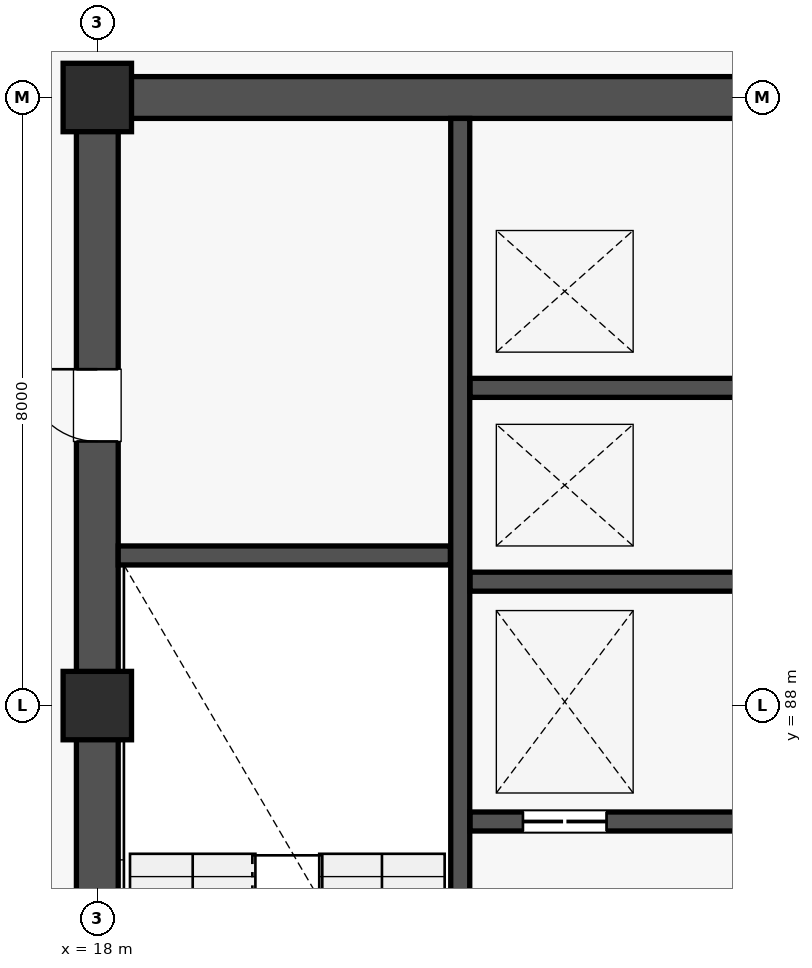
"""IFC4 building model, lengths in metres.
Left out: names, types, materials, properties, quantities, classifications, styles, units other than length and angle.
Written with IfcOpenShell. Run it as: python <this file> out.ifc"""

import sys

from ifc_helpers import new_model, si_unit, direction, frame, frame_2d, origin, origin_2d, place, context, subcontext, project, spatial, rectangle, extrude, element, fill, save


model = new_model("IFC4")
c1 = context("Model", 3, precision=1e-05, world=origin(), true_north=direction((0.0, 1.0)))
c2 = subcontext(c1, "Body", "Model", "MODEL_VIEW")
j1 = project(units=[si_unit("LENGTHUNIT", "METRE"), si_unit("PLANEANGLEUNIT", "RADIAN")], contexts=[c1])
p1 = place(None, origin())
s1 = spatial("IfcSite", under=j1, at=p1, CompositionType="ELEMENT")
p2 = place(p1, origin())
s2 = spatial("IfcBuilding", under=s1, at=p2, CompositionType="ELEMENT")
p3 = place(p2, frame((0.0, 0.0, 18.0)))
s3 = spatial("IfcBuildingStorey", under=s2, at=p3, CompositionType="ELEMENT", Elevation=18.0)
for number, where, z_axis, x_axis in (
    (1, (18.0, 88.0, 0.0), (0.0, 0.0, 1.0), (1.0, 0.0, 0.0)),
    (2, (18.0, 96.0, 0.0), (0.0, 0.0, 1.0), (1.0, 0.0, 0.0)),
):
    element("IfcColumn", number, at=place(p3, frame(where, z_axis=z_axis, x_axis=x_axis)), inside=s3, PredefinedType="COLUMN", context=c2, shape_type="SweptSolid", body=[
        extrude(rectangle(XDim=0.9, YDim=0.9, at=origin_2d()), origin(), (0.0, 0.0, 1.0), 3.9),
    ])
p4 = place(p3, frame((18.275, 96.0, 0.0), z_axis=(0.0, 0.0, 1.0), x_axis=(1.0, 0.0, 0.0)))
e3 = element("IfcWall", 3, at=p4, inside=s3, PredefinedType="SHEAR", context=c2, shape_type="SweptSolid", body=[
    extrude(rectangle(XDim=8.45, YDim=0.55, at=frame_2d((4.225, 0.0))), origin(), (0.0, 0.0, 1.0), 3.65),
])
p5 = place(p3, frame((18.0, 80.275, 0.0), z_axis=(0.0, 0.0, 1.0), x_axis=(0.0, 1.0, 0.0)))
e4 = element("IfcWall", 4, at=p5, inside=s3, PredefinedType="SHEAR", context=c2, shape_type="SweptSolid", body=[
    extrude(rectangle(XDim=15.45, YDim=0.55, at=frame_2d((7.725, 0.0))), origin(), (0.0, 0.0, 1.0), 3.65),
])
p6 = place(p5, frame((11.2, 0.0, 0.0)))
e5 = element("IfcOpeningElement", 5, at=p6, cuts=e4, PredefinedType="OPENING", context=c2, shape_type="SweptSolid", body=[
    extrude(rectangle(XDim=0.95, YDim=2.1, at=frame_2d((0.475, 1.05))), frame((0.0, 0.287, 0.0), z_axis=(0.0, -1.0, 0.0), x_axis=(1.0, 0.0, 0.0)), (0.0, 0.0, 1.0), 0.574),
])
p7 = place(p3, frame((22.775, 80.275, 0.0), z_axis=(0.0, 0.0, 1.0), x_axis=(0.0, 1.0, 0.0)))
e6 = element("IfcWall", 6, at=p7, inside=s3, PredefinedType="SOLIDWALL", context=c2, shape_type="SweptSolid", body=[
    extrude(rectangle(XDim=15.45, YDim=0.25, at=frame_2d((7.725, 0.0))), origin(), (0.0, 0.0, 1.0), 3.65),
])
p8 = place(p7, frame((0.45, 0.0, 0.0)))
e7 = element("IfcOpeningElement", 7, at=p8, cuts=e6, PredefinedType="OPENING", context=c2, shape_type="SweptSolid", body=[
    extrude(rectangle(XDim=1.1, YDim=2.15, at=frame_2d((0.55, 1.075))), frame((0.0, 0.137, 0.0), z_axis=(0.0, -1.0, 0.0), x_axis=(1.0, 0.0, 0.0)), (0.0, 0.0, 1.0), 0.274),
])
p9 = place(p3, frame((18.275, 89.975, 0.0), z_axis=(0.0, 0.0, 1.0), x_axis=(1.0, 0.0, 0.0)))
e8 = element("IfcWall", 8, at=p9, inside=s3, PredefinedType="SOLIDWALL", context=c2, shape_type="SweptSolid", body=[
    extrude(rectangle(XDim=4.37, YDim=0.25, at=frame_2d((2.185, 0.0))), origin(), (0.0, 0.0, 1.0), 3.65),
])
p10 = place(p3, frame((22.905, 86.475, 0.0), z_axis=(0.0, 0.0, 1.0), x_axis=(1.0, 0.0, 0.0)))
e9 = element("IfcWall", 9, at=p10, inside=s3, PredefinedType="SOLIDWALL", context=c2, shape_type="SweptSolid", body=[
    extrude(rectangle(XDim=3.82, YDim=0.25, at=frame_2d((1.91, 0.0))), origin(), (0.0, 0.0, 1.0), 3.65),
])
p11 = place(p10, frame((0.695, 0.0, 0.0)))
e10 = element("IfcOpeningElement", 10, at=p11, cuts=e9, PredefinedType="OPENING", context=c2, shape_type="SweptSolid", body=[
    extrude(rectangle(XDim=1.1, YDim=2.12, at=frame_2d((0.55, 1.06))), frame((0.0, 0.137, 0.0), z_axis=(0.0, -1.0, 0.0), x_axis=(1.0, 0.0, 0.0)), (0.0, 0.0, 1.0), 0.274),
])
for number, where, z_axis, x_axis in (
    (11, (22.905, 89.63, 0.0), (0.0, 0.0, 1.0), (1.0, 0.0, 0.0)),
    (12, (22.905, 92.18, 0.0), (0.0, 0.0, 1.0), (1.0, 0.0, 0.0)),
):
    element("IfcWall", number, at=place(p3, frame(where, z_axis=z_axis, x_axis=x_axis)), inside=s3, PredefinedType="SOLIDWALL", context=c2, shape_type="SweptSolid", body=[
        extrude(rectangle(XDim=3.82, YDim=0.25, at=frame_2d((1.91, 0.0))), origin(), (0.0, 0.0, 1.0), 3.65),
    ])
p12 = place(p6, origin())
e13 = element("IfcDoor", 13, at=p12, inside=s3, OperationType="SINGLE_SWING_RIGHT", PredefinedType="DOOR", context=c2, shape_type="SweptSolid", body=[
    extrude(rectangle(XDim=0.95, YDim=2.1, at=frame_2d((0.475, 1.05))), frame((0.0, 0.025, 0.0), z_axis=(0.0, -1.0, 0.0), x_axis=(1.0, 0.0, 0.0)), (0.0, 0.0, 1.0), 0.05),
])
fill(e5, e13)
p13 = place(p11, origin())
e14 = element("IfcDoor", 14, at=p13, inside=s3, OperationType="DOUBLE_DOOR_SLIDING", PredefinedType="DOOR", context=c2, shape_type="SweptSolid", body=[
    extrude(rectangle(XDim=1.1, YDim=2.12, at=frame_2d((0.55, 1.06))), frame((0.0, 0.025, 0.0), z_axis=(0.0, -1.0, 0.0), x_axis=(1.0, 0.0, 0.0)), (0.0, 0.0, 1.0), 0.05),
])
fill(e10, e14)
save(model, sys.argv[1])
